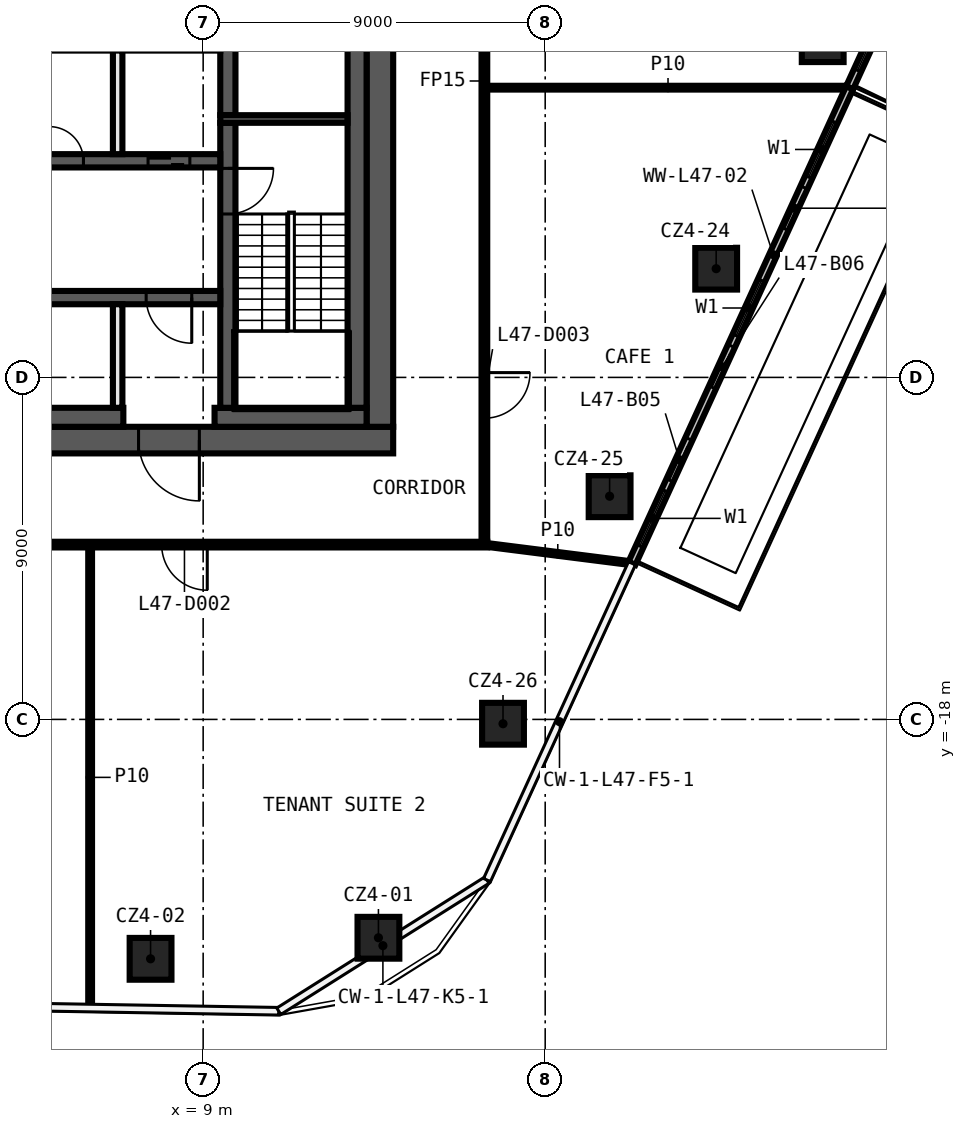
"""IFC4 building model, lengths in metres.
Left out: names, types, materials, properties, quantities, classifications, styles, units other than length and angle.
Written with IfcOpenShell. Run it as: python <this file> out.ifc"""

import sys

from ifc_helpers import new_model, si_unit, direction, frame, frame_2d, origin, origin_2d, place, context, subcontext, project, spatial, rectangle, extrude, element, fill, save


model = new_model("IFC4")
c1 = context("Model", 3, precision=1e-05, world=origin(), true_north=direction((0.0, 1.0)))
c2 = subcontext(c1, "Body", "Model", "MODEL_VIEW")
j1 = project(units=[si_unit("LENGTHUNIT", "METRE"), si_unit("PLANEANGLEUNIT", "RADIAN")], contexts=[c1])
p1 = place(None, origin())
s1 = spatial("IfcSite", under=j1, at=p1, CompositionType="ELEMENT")
p2 = place(p1, origin())
s2 = spatial("IfcBuilding", under=s1, at=p2, CompositionType="ELEMENT")
p3 = place(p2, frame((0.0, 0.0, 228.6)))
s3 = spatial("IfcBuildingStorey", under=s2, at=p3, CompositionType="ELEMENT", Elevation=228.6)
for number, where, z_axis, x_axis in (
    (1, (13.612, -23.746, 0.0), (0.0, 0.0, 1.0), (1.0, 0.0, 0.0)),
    (2, (7.616, -24.3, 0.0), (0.0, 0.0, 1.0), (1.0, 0.0, 0.0)),
    (3, (25.302, -0.152, 0.0), (0.0, 0.0, 1.0), (1.0, 0.0, 0.0)),
    (4, (22.499, -6.139, 0.0), (0.0, 0.0, 1.0), (1.0, 0.0, 0.0)),
    (5, (19.695, -12.127, 0.0), (0.0, 0.0, 1.0), (1.0, 0.0, 0.0)),
    (6, (16.89, -18.114, 0.0), (0.0, 0.0, 1.0), (1.0, 0.0, 0.0)),
):
    element("IfcColumn", number, at=place(p3, frame(where, z_axis=z_axis, x_axis=x_axis)), inside=s3, PredefinedType="COLUMN", context=c2, shape_type="SweptSolid", body=[
        extrude(rectangle(XDim=1.1, YDim=1.1, at=origin_2d()), origin(), (0.0, 0.0, 1.0), 3.75),
    ])
p4 = place(p3, frame((16.475, -13.4, 0.0), z_axis=(0.0, 0.0, 1.0), x_axis=(-1.0, 0.0, 0.0)))
e7 = element("IfcWall", 7, at=p4, inside=s3, PredefinedType="PARTITIONING", context=c2, shape_type="SweptSolid", body=[
    extrude(rectangle(XDim=18.55, YDim=0.15, at=frame_2d((9.275, 0.0))), origin(), (0.0, 0.0, 1.0), 3.75),
])
p5 = place(p4, frame((7.367, 0.0, 0.0)))
e8 = element("IfcOpeningElement", 8, at=p5, cuts=e7, PredefinedType="OPENING", context=c2, shape_type="SweptSolid", body=[
    extrude(rectangle(XDim=1.2, YDim=2.1, at=frame_2d((0.6, 1.05))), frame((0.0, 0.085, 0.0), z_axis=(0.0, -1.0, 0.0), x_axis=(1.0, 0.0, 0.0)), (0.0, 0.0, 1.0), 0.17),
])
p6 = place(p3, frame((16.475, -1.376, 0.0), z_axis=(0.0, 0.0, 1.0), x_axis=(1.0, 0.0, 0.0)))
e9 = element("IfcWall", 9, at=p6, inside=s3, PredefinedType="PARTITIONING", context=c2, shape_type="SweptSolid", body=[
    extrude(rectangle(XDim=9.514, YDim=0.1, at=frame_2d((4.757, 0.0))), origin(), (0.0, 0.0, 1.0), 3.75),
])
p7 = place(p3, frame((16.4, 13.325, 0.0), z_axis=(0.0, 0.0, 1.0), x_axis=(0.0, -1.0, 0.0)))
e10 = element("IfcWall", 10, at=p7, inside=s3, PredefinedType="PARTITIONING", context=c2, shape_type="SweptSolid", body=[
    extrude(rectangle(XDim=26.65, YDim=0.15, at=frame_2d((13.325, 0.0))), origin(), (0.0, 0.0, 1.0), 3.75),
])
p8 = place(p7, frame((22.199, 0.0, 0.0)))
e11 = element("IfcOpeningElement", 11, at=p8, cuts=e10, PredefinedType="OPENING", context=c2, shape_type="SweptSolid", body=[
    extrude(rectangle(XDim=1.2, YDim=2.1, at=frame_2d((0.6, 1.05))), frame((0.0, 0.085, 0.0), z_axis=(0.0, -1.0, 0.0), x_axis=(1.0, 0.0, 0.0)), (0.0, 0.0, 1.0), 0.17),
])
p9 = place(p7, frame((5.651, 0.0, 0.0)))
e12 = element("IfcOpeningElement", 12, at=p9, cuts=e10, PredefinedType="OPENING", context=c2, shape_type="SweptSolid", body=[
    extrude(rectangle(XDim=1.2, YDim=2.1, at=frame_2d((0.6, 1.05))), frame((0.0, 0.085, 0.0), z_axis=(0.0, -1.0, 0.0), x_axis=(1.0, 0.0, 0.0)), (0.0, 0.0, 1.0), 0.17),
])
p10 = place(p3, frame((6.026, -25.576, 0.0), z_axis=(0.0, 0.0, 1.0), x_axis=(0.0, 1.0, 0.0)))
e13 = element("IfcWall", 13, at=p10, inside=s3, PredefinedType="PARTITIONING", context=c2, shape_type="SweptSolid", body=[
    extrude(rectangle(XDim=12.101, YDim=0.1, at=frame_2d((6.05, 0.0))), origin(), (0.0, 0.0, 1.0), 3.75),
])
p11 = place(p3, frame((16.4, -13.4, 0.0), z_axis=(0.0, 0.0, 1.0), x_axis=(0.992073977013, -0.125655179493, 0.0)))
e14 = element("IfcWall", 14, at=p11, inside=s3, PredefinedType="PARTITIONING", context=c2, shape_type="SweptSolid", body=[
    extrude(rectangle(XDim=3.894, YDim=0.1, at=frame_2d((1.947, 0.0))), origin(), (0.0, 0.0, 1.0), 3.75),
])
p12 = place(p3, frame((20.283, -13.892, 0.0), z_axis=(0.0, 0.0, 1.0), x_axis=(0.416106802435, 0.909315747674, 0.0)))
e15 = element("IfcWall", 15, at=p12, inside=s3, PredefinedType="SOLIDWALL", context=c2, shape_type="SweptSolid", body=[
    extrude(rectangle(XDim=13.765, YDim=0.2, at=frame_2d((6.882, 0.0))), origin(), (0.0, 0.0, 1.0), 3.75),
])
p13 = place(p12, frame((0.5, 0.0, 0.6)))
e16 = element("IfcOpeningElement", 16, at=p13, cuts=e15, PredefinedType="OPENING", context=c2, shape_type="SweptSolid", body=[
    extrude(rectangle(XDim=1.6, YDim=2.4, at=frame_2d((0.8, 1.2))), frame((0.0, 0.11, 0.0), z_axis=(0.0, -1.0, 0.0), x_axis=(1.0, 0.0, 0.0)), (0.0, 0.0, 1.0), 0.22),
])
p14 = place(p12, frame((2.4, 0.0, 0.0)))
e17 = element("IfcOpeningElement", 17, at=p14, cuts=e15, PredefinedType="OPENING", context=c2, shape_type="SweptSolid", body=[
    extrude(rectangle(XDim=1.2, YDim=2.4, at=frame_2d((0.6, 1.2))), frame((0.0, 0.11, 0.0), z_axis=(0.0, -1.0, 0.0), x_axis=(1.0, 0.0, 0.0)), (0.0, 0.0, 1.0), 0.22),
])
p15 = place(p12, frame((6.588, 0.0, 0.6)))
e18 = element("IfcOpeningElement", 18, at=p15, cuts=e15, PredefinedType="OPENING", context=c2, shape_type="SweptSolid", body=[
    extrude(rectangle(XDim=1.6, YDim=2.4, at=frame_2d((0.8, 1.2))), frame((0.0, 0.11, 0.0), z_axis=(0.0, -1.0, 0.0), x_axis=(1.0, 0.0, 0.0)), (0.0, 0.0, 1.0), 0.22),
])
p16 = place(p12, frame((5.088, 0.0, 0.0)))
e19 = element("IfcOpeningElement", 19, at=p16, cuts=e15, PredefinedType="OPENING", context=c2, shape_type="SweptSolid", body=[
    extrude(rectangle(XDim=1.2, YDim=2.4, at=frame_2d((0.6, 1.2))), frame((0.0, 0.11, 0.0), z_axis=(0.0, -1.0, 0.0), x_axis=(1.0, 0.0, 0.0)), (0.0, 0.0, 1.0), 0.22),
])
p17 = place(p12, frame((11.176, 0.0, 0.6)))
e20 = element("IfcOpeningElement", 20, at=p17, cuts=e15, PredefinedType="OPENING", context=c2, shape_type="SweptSolid", body=[
    extrude(rectangle(XDim=1.6, YDim=2.4, at=frame_2d((0.8, 1.2))), frame((0.0, 0.11, 0.0), z_axis=(0.0, -1.0, 0.0), x_axis=(1.0, 0.0, 0.0)), (0.0, 0.0, 1.0), 0.22),
])
p18 = place(p12, frame((9.676, 0.0, 0.0)))
e21 = element("IfcOpeningElement", 21, at=p18, cuts=e15, PredefinedType="OPENING", context=c2, shape_type="SweptSolid", body=[
    extrude(rectangle(XDim=1.2, YDim=2.4, at=frame_2d((0.6, 1.2))), frame((0.0, 0.11, 0.0), z_axis=(0.0, -1.0, 0.0), x_axis=(1.0, 0.0, 0.0)), (0.0, 0.0, 1.0), 0.22),
])
p19 = place(p3, frame((26.011, -1.376, 0.0), z_axis=(0.0, 0.0, 1.0), x_axis=(0.416127690122, 0.909306189088, 0.0)))
e22 = element("IfcWall", 22, at=p19, inside=s3, PredefinedType="SOLIDWALL", context=c2, shape_type="SweptSolid", body=[
    extrude(rectangle(XDim=4.579, YDim=0.2, at=frame_2d((2.289, 0.0))), origin(), (0.0, 0.0, 1.0), 3.75),
])
p20 = place(p19, frame((0.5, 0.0, 0.6)))
e23 = element("IfcOpeningElement", 23, at=p20, cuts=e22, PredefinedType="OPENING", context=c2, shape_type="SweptSolid", body=[
    extrude(rectangle(XDim=1.6, YDim=2.4, at=frame_2d((0.8, 1.2))), frame((0.0, 0.11, 0.0), z_axis=(0.0, -1.0, 0.0), x_axis=(1.0, 0.0, 0.0)), (0.0, 0.0, 1.0), 0.22),
])
p21 = place(p19, frame((2.4, 0.0, 0.0)))
e24 = element("IfcOpeningElement", 24, at=p21, cuts=e22, PredefinedType="OPENING", context=c2, shape_type="SweptSolid", body=[
    extrude(rectangle(XDim=1.2, YDim=2.4, at=frame_2d((0.6, 1.2))), frame((0.0, 0.11, 0.0), z_axis=(0.0, -1.0, 0.0), x_axis=(1.0, 0.0, 0.0)), (0.0, 0.0, 1.0), 0.22),
])
p22 = place(p3, frame((14.0, -10.65, 0.0), z_axis=(0.0, 0.0, 1.0), x_axis=(-1.0, 0.0, 0.0)))
e25 = element("IfcWall", 25, at=p22, inside=s3, PredefinedType="SHEAR", context=c2, shape_type="SweptSolid", body=[
    extrude(rectangle(XDim=28.0, YDim=0.7, at=frame_2d((14.0, 0.0))), origin(), (0.0, 0.0, 1.0), 3.75),
])
p23 = place(p22, frame((5.1, 0.0, 0.0)))
e26 = element("IfcOpeningElement", 26, at=p23, cuts=e25, PredefinedType="OPENING", context=c2, shape_type="SweptSolid", body=[
    extrude(rectangle(XDim=1.6, YDim=2.1, at=frame_2d((0.8, 1.05))), frame((0.0, 0.36, 0.0), z_axis=(0.0, -1.0, 0.0), x_axis=(1.0, 0.0, 0.0)), (0.0, 0.0, 1.0), 0.72),
])
p24 = place(p3, frame((13.65, 10.3, 0.0), z_axis=(0.0, 0.0, 1.0), x_axis=(0.0, -1.0, 0.0)))
e27 = element("IfcWall", 27, at=p24, inside=s3, PredefinedType="SHEAR", context=c2, shape_type="SweptSolid", body=[
    extrude(rectangle(XDim=20.6, YDim=0.7, at=frame_2d((10.3, 0.0))), origin(), (0.0, 0.0, 1.0), 3.75),
])
p25 = place(p3, frame((13.3, -10.05, 0.0), z_axis=(0.0, 0.0, 1.0), x_axis=(-1.0, 0.0, 0.0)))
e28 = element("IfcWall", 28, at=p25, inside=s3, PredefinedType="SHEAR", context=c2, shape_type="SweptSolid", body=[
    extrude(rectangle(XDim=4.0, YDim=0.5, at=frame_2d((2.0, 0.0))), origin(), (0.0, 0.0, 1.0), 3.75),
])
p26 = place(p3, frame((6.9, -10.05, 0.0), z_axis=(0.0, 0.0, 1.0), x_axis=(-1.0, 0.0, 0.0)))
e29 = element("IfcWall", 29, at=p26, inside=s3, PredefinedType="SHEAR", context=c2, shape_type="SweptSolid", body=[
    extrude(rectangle(XDim=20.2, YDim=0.5, at=frame_2d((10.1, 0.0))), origin(), (0.0, 0.0, 1.0), 3.75),
])
p27 = place(p3, frame((13.05, 9.8, 0.0), z_axis=(0.0, 0.0, 1.0), x_axis=(0.0, -1.0, 0.0)))
e30 = element("IfcWall", 30, at=p27, inside=s3, PredefinedType="SHEAR", context=c2, shape_type="SweptSolid", body=[
    extrude(rectangle(XDim=19.6, YDim=0.5, at=frame_2d((9.8, 0.0))), origin(), (0.0, 0.0, 1.0), 3.75),
])
p28 = place(p3, frame((9.65, -2.3, 0.0), z_axis=(0.0, 0.0, 1.0), x_axis=(0.0, -1.0, 0.0)))
e31 = element("IfcWall", 31, at=p28, inside=s3, PredefinedType="SHEAR", context=c2, shape_type="SweptSolid", body=[
    extrude(rectangle(XDim=7.5, YDim=0.4, at=frame_2d((3.75, 0.0))), origin(), (0.0, 0.0, 1.0), 3.75),
])
p29 = place(p28, frame((1.2, 0.0, 0.0)))
e32 = element("IfcOpeningElement", 32, at=p29, cuts=e31, PredefinedType="OPENING", context=c2, shape_type="SweptSolid", body=[
    extrude(rectangle(XDim=1.2, YDim=2.1, at=frame_2d((0.6, 1.05))), frame((0.0, 0.21, 0.0), z_axis=(0.0, -1.0, 0.0), x_axis=(1.0, 0.0, 0.0)), (0.0, 0.0, 1.0), 0.42),
])
p30 = place(p3, frame((9.65, 2.1, 0.0), z_axis=(0.0, 0.0, 1.0), x_axis=(0.0, -1.0, 0.0)))
e33 = element("IfcWall", 33, at=p30, inside=s3, PredefinedType="SHEAR", context=c2, shape_type="SweptSolid", body=[
    extrude(rectangle(XDim=4.2, YDim=0.4, at=frame_2d((2.1, 0.0))), origin(), (0.0, 0.0, 1.0), 3.75),
])
p31 = place(p30, frame((0.15, 0.0, 0.0)))
e34 = element("IfcOpeningElement", 34, at=p31, cuts=e33, PredefinedType="OPENING", context=c2, shape_type="SweptSolid", body=[
    extrude(rectangle(XDim=0.9, YDim=2.1, at=frame_2d((0.45, 1.05))), frame((0.0, 0.21, 0.0), z_axis=(0.0, -1.0, 0.0), x_axis=(1.0, 0.0, 0.0)), (0.0, 0.0, 1.0), 0.42),
])
p32 = place(p3, frame((9.45, -2.2, 0.0), z_axis=(0.0, 0.0, 1.0), x_axis=(1.0, 0.0, 0.0)))
e35 = element("IfcWall", 35, at=p32, inside=s3, PredefinedType="SHEAR", context=c2, shape_type="SweptSolid", body=[
    extrude(rectangle(XDim=3.35, YDim=0.2, at=frame_2d((1.675, 0.0))), origin(), (0.0, 0.0, 1.0), 3.75),
])
p33 = place(p3, frame((-9.45, -3.3, 0.0), z_axis=(0.0, 0.0, 1.0), x_axis=(1.0, 0.0, 0.0)))
e36 = element("IfcWall", 36, at=p33, inside=s3, PredefinedType="SHEAR", context=c2, shape_type="SweptSolid", body=[
    extrude(rectangle(XDim=18.9, YDim=0.35, at=frame_2d((9.45, 0.0))), origin(), (0.0, 0.0, 1.0), 3.75),
])
p34 = place(p33, frame((0.8, 0.0, 0.0)))
e37 = element("IfcOpeningElement", 37, at=p34, cuts=e36, PredefinedType="OPENING", context=c2, shape_type="SweptSolid", body=[
    extrude(rectangle(XDim=1.1, YDim=2.1, at=frame_2d((0.55, 1.05))), frame((0.0, 0.185, 0.0), z_axis=(0.0, -1.0, 0.0), x_axis=(1.0, 0.0, 0.0)), (0.0, 0.0, 1.0), 0.37),
])
p35 = place(p33, frame((3.5, 0.0, 0.0)))
e38 = element("IfcOpeningElement", 38, at=p35, cuts=e36, PredefinedType="OPENING", context=c2, shape_type="SweptSolid", body=[
    extrude(rectangle(XDim=1.1, YDim=2.1, at=frame_2d((0.55, 1.05))), frame((0.0, 0.185, 0.0), z_axis=(0.0, -1.0, 0.0), x_axis=(1.0, 0.0, 0.0)), (0.0, 0.0, 1.0), 0.37),
])
p36 = place(p33, frame((6.2, 0.0, 0.0)))
e39 = element("IfcOpeningElement", 39, at=p36, cuts=e36, PredefinedType="OPENING", context=c2, shape_type="SweptSolid", body=[
    extrude(rectangle(XDim=1.1, YDim=2.1, at=frame_2d((0.55, 1.05))), frame((0.0, 0.185, 0.0), z_axis=(0.0, -1.0, 0.0), x_axis=(1.0, 0.0, 0.0)), (0.0, 0.0, 1.0), 0.37),
])
p37 = place(p33, frame((8.9, 0.0, 0.0)))
e40 = element("IfcOpeningElement", 40, at=p37, cuts=e36, PredefinedType="OPENING", context=c2, shape_type="SweptSolid", body=[
    extrude(rectangle(XDim=1.1, YDim=2.1, at=frame_2d((0.55, 1.05))), frame((0.0, 0.185, 0.0), z_axis=(0.0, -1.0, 0.0), x_axis=(1.0, 0.0, 0.0)), (0.0, 0.0, 1.0), 0.37),
])
p38 = place(p33, frame((17.0, 0.0, 0.0)))
e41 = element("IfcOpeningElement", 41, at=p38, cuts=e36, PredefinedType="OPENING", context=c2, shape_type="SweptSolid", body=[
    extrude(rectangle(XDim=1.1, YDim=2.1, at=frame_2d((0.55, 1.05))), frame((0.0, 0.185, 0.0), z_axis=(0.0, -1.0, 0.0), x_axis=(1.0, 0.0, 0.0)), (0.0, 0.0, 1.0), 0.37),
])
p39 = place(p33, frame((11.7, 0.0, 0.0)))
e42 = element("IfcOpeningElement", 42, at=p39, cuts=e36, PredefinedType="OPENING", context=c2, shape_type="SweptSolid", body=[
    extrude(rectangle(XDim=0.9, YDim=2.1, at=frame_2d((0.45, 1.05))), frame((0.0, 0.185, 0.0), z_axis=(0.0, -1.0, 0.0), x_axis=(1.0, 0.0, 0.0)), (0.0, 0.0, 1.0), 0.37),
])
p40 = place(p33, frame((14.4, 0.0, 0.0)))
e43 = element("IfcOpeningElement", 43, at=p40, cuts=e36, PredefinedType="OPENING", context=c2, shape_type="SweptSolid", body=[
    extrude(rectangle(XDim=0.9, YDim=2.1, at=frame_2d((0.45, 1.05))), frame((0.0, 0.185, 0.0), z_axis=(0.0, -1.0, 0.0), x_axis=(1.0, 0.0, 0.0)), (0.0, 0.0, 1.0), 0.37),
])
p41 = place(p3, frame((9.45, -6.9, 0.0), z_axis=(0.0, 0.0, 1.0), x_axis=(-1.0, 0.0, 0.0)))
e44 = element("IfcWall", 44, at=p41, inside=s3, PredefinedType="SHEAR", context=c2, shape_type="SweptSolid", body=[
    extrude(rectangle(XDim=18.9, YDim=0.35, at=frame_2d((9.45, 0.0))), origin(), (0.0, 0.0, 1.0), 3.75),
])
p42 = place(p41, frame((0.75, 0.0, 0.0)))
e45 = element("IfcOpeningElement", 45, at=p42, cuts=e44, PredefinedType="OPENING", context=c2, shape_type="SweptSolid", body=[
    extrude(rectangle(XDim=1.2, YDim=2.1, at=frame_2d((0.6, 1.05))), frame((0.0, 0.185, 0.0), z_axis=(0.0, -1.0, 0.0), x_axis=(1.0, 0.0, 0.0)), (0.0, 0.0, 1.0), 0.37),
])
p43 = place(p41, frame((15.75, 0.0, 0.0)))
e46 = element("IfcOpeningElement", 46, at=p43, cuts=e44, PredefinedType="OPENING", context=c2, shape_type="SweptSolid", body=[
    extrude(rectangle(XDim=0.9, YDim=2.1, at=frame_2d((0.45, 1.05))), frame((0.0, 0.185, 0.0), z_axis=(0.0, -1.0, 0.0), x_axis=(1.0, 0.0, 0.0)), (0.0, 0.0, 1.0), 0.37),
])
p44 = place(p41, frame((10.35, 0.0, 0.0)))
e47 = element("IfcOpeningElement", 47, at=p44, cuts=e44, PredefinedType="OPENING", context=c2, shape_type="SweptSolid", body=[
    extrude(rectangle(XDim=0.9, YDim=2.1, at=frame_2d((0.45, 1.05))), frame((0.0, 0.185, 0.0), z_axis=(0.0, -1.0, 0.0), x_axis=(1.0, 0.0, 0.0)), (0.0, 0.0, 1.0), 0.37),
])
for number, where, z_axis, x_axis in (
    (48, (6.75, -9.8, 0.0), (0.0, 0.0, 1.0), (0.0, 1.0, 0.0)),
    (49, (6.75, -3.125, 0.0), (0.0, 0.0, 1.0), (0.0, 1.0, 0.0)),
):
    element("IfcWall", number, at=place(p3, frame(where, z_axis=z_axis, x_axis=x_axis)), inside=s3, PredefinedType="SOLIDWALL", context=c2, shape_type="SweptSolid", body=[
        extrude(rectangle(XDim=2.725, YDim=0.25, at=frame_2d((1.363, 0.0))), origin(), (0.0, 0.0, 1.0), 3.75),
    ])
p45 = place(p5, origin())
e50 = element("IfcDoor", 50, at=p45, inside=s3, OperationType="SINGLE_SWING_LEFT", PredefinedType="DOOR", context=c2, shape_type="SweptSolid", body=[
    extrude(rectangle(XDim=1.2, YDim=2.1, at=frame_2d((0.6, 1.05))), frame((0.0, 0.025, 0.0), z_axis=(0.0, -1.0, 0.0), x_axis=(1.0, 0.0, 0.0)), (0.0, 0.0, 1.0), 0.05),
])
fill(e8, e50)
p46 = place(p8, origin())
e51 = element("IfcDoor", 51, at=p46, inside=s3, OperationType="SINGLE_SWING_RIGHT", PredefinedType="DOOR", context=c2, shape_type="SweptSolid", body=[
    extrude(rectangle(XDim=1.2, YDim=2.1, at=frame_2d((0.6, 1.05))), frame((0.0, 0.025, 0.0), z_axis=(0.0, -1.0, 0.0), x_axis=(1.0, 0.0, 0.0)), (0.0, 0.0, 1.0), 0.05),
])
fill(e11, e51)
p47 = place(p13, origin())
e52 = element("IfcWindow", 52, at=p47, inside=s3, PartitioningType="SINGLE_PANEL", PredefinedType="WINDOW", context=c2, shape_type="SweptSolid", body=[
    extrude(rectangle(XDim=1.6, YDim=2.4, at=frame_2d((0.8, 1.2))), frame((0.0, 0.03, 0.0), z_axis=(0.0, -1.0, 0.0), x_axis=(1.0, 0.0, 0.0)), (0.0, 0.0, 1.0), 0.06),
])
fill(e16, e52)
p48 = place(p14, origin())
e53 = element("IfcDoor", 53, at=p48, inside=s3, OperationType="SLIDING_TO_LEFT", PredefinedType="DOOR", context=c2, shape_type="SweptSolid", body=[
    extrude(rectangle(XDim=1.2, YDim=2.4, at=frame_2d((0.6, 1.2))), frame((0.0, 0.025, 0.0), z_axis=(0.0, -1.0, 0.0), x_axis=(1.0, 0.0, 0.0)), (0.0, 0.0, 1.0), 0.05),
])
fill(e17, e53)
p49 = place(p15, origin())
e54 = element("IfcWindow", 54, at=p49, inside=s3, PartitioningType="SINGLE_PANEL", PredefinedType="WINDOW", context=c2, shape_type="SweptSolid", body=[
    extrude(rectangle(XDim=1.6, YDim=2.4, at=frame_2d((0.8, 1.2))), frame((0.0, 0.03, 0.0), z_axis=(0.0, -1.0, 0.0), x_axis=(1.0, 0.0, 0.0)), (0.0, 0.0, 1.0), 0.06),
])
fill(e18, e54)
p50 = place(p16, origin())
e55 = element("IfcDoor", 55, at=p50, inside=s3, OperationType="SLIDING_TO_LEFT", PredefinedType="DOOR", context=c2, shape_type="SweptSolid", body=[
    extrude(rectangle(XDim=1.2, YDim=2.4, at=frame_2d((0.6, 1.2))), frame((0.0, 0.025, 0.0), z_axis=(0.0, -1.0, 0.0), x_axis=(1.0, 0.0, 0.0)), (0.0, 0.0, 1.0), 0.05),
])
fill(e19, e55)
p51 = place(p17, origin())
e56 = element("IfcWindow", 56, at=p51, inside=s3, PartitioningType="SINGLE_PANEL", PredefinedType="WINDOW", context=c2, shape_type="SweptSolid", body=[
    extrude(rectangle(XDim=1.6, YDim=2.4, at=frame_2d((0.8, 1.2))), frame((0.0, 0.03, 0.0), z_axis=(0.0, -1.0, 0.0), x_axis=(1.0, 0.0, 0.0)), (0.0, 0.0, 1.0), 0.06),
])
fill(e20, e56)
p52 = place(p18, origin())
e57 = element("IfcDoor", 57, at=p52, inside=s3, OperationType="SLIDING_TO_LEFT", PredefinedType="DOOR", context=c2, shape_type="SweptSolid", body=[
    extrude(rectangle(XDim=1.2, YDim=2.4, at=frame_2d((0.6, 1.2))), frame((0.0, 0.025, 0.0), z_axis=(0.0, -1.0, 0.0), x_axis=(1.0, 0.0, 0.0)), (0.0, 0.0, 1.0), 0.05),
])
fill(e21, e57)
p53 = place(p20, origin())
e58 = element("IfcWindow", 58, at=p53, inside=s3, PartitioningType="SINGLE_PANEL", PredefinedType="WINDOW", context=c2, shape_type="SweptSolid", body=[
    extrude(rectangle(XDim=1.6, YDim=2.4, at=frame_2d((0.8, 1.2))), frame((0.0, 0.03, 0.0), z_axis=(0.0, -1.0, 0.0), x_axis=(1.0, 0.0, 0.0)), (0.0, 0.0, 1.0), 0.06),
])
fill(e23, e58)
p54 = place(p38, origin())
e59 = element("IfcDoor", 59, at=p54, inside=s3, OperationType="DOUBLE_DOOR_SLIDING", PredefinedType="DOOR", context=c2, shape_type="SweptSolid", body=[
    extrude(rectangle(XDim=1.1, YDim=2.1, at=frame_2d((0.55, 1.05))), frame((0.0, 0.025, 0.0), z_axis=(0.0, -1.0, 0.0), x_axis=(1.0, 0.0, 0.0)), (0.0, 0.0, 1.0), 0.05),
])
fill(e41, e59)
p55 = place(p23, origin())
e60 = element("IfcDoor", 60, at=p55, inside=s3, OperationType="DOUBLE_DOOR_SINGLE_SWING", PredefinedType="DOOR", context=c2, shape_type="SweptSolid", body=[
    extrude(rectangle(XDim=1.6, YDim=2.1, at=frame_2d((0.8, 1.05))), frame((0.0, 0.025, 0.0), z_axis=(0.0, -1.0, 0.0), x_axis=(1.0, 0.0, 0.0)), (0.0, 0.0, 1.0), 0.05),
])
fill(e26, e60)
p56 = place(p42, origin())
e61 = element("IfcDoor", 61, at=p56, inside=s3, OperationType="SINGLE_SWING_LEFT", PredefinedType="DOOR", context=c2, shape_type="SweptSolid", body=[
    extrude(rectangle(XDim=1.2, YDim=2.1, at=frame_2d((0.6, 1.05))), frame((0.0, 0.025, 0.0), z_axis=(0.0, -1.0, 0.0), x_axis=(1.0, 0.0, 0.0)), (0.0, 0.0, 1.0), 0.05),
])
fill(e45, e61)
p57 = place(p40, origin())
e62 = element("IfcDoor", 62, at=p57, inside=s3, OperationType="SINGLE_SWING_LEFT", PredefinedType="DOOR", context=c2, shape_type="SweptSolid", body=[
    extrude(rectangle(XDim=0.9, YDim=2.1, at=frame_2d((0.45, 1.05))), frame((0.0, 0.025, 0.0), z_axis=(0.0, -1.0, 0.0), x_axis=(1.0, 0.0, 0.0)), (0.0, 0.0, 1.0), 0.05),
])
fill(e43, e62)
p58 = place(p29, origin())
e63 = element("IfcDoor", 63, at=p58, inside=s3, OperationType="SINGLE_SWING_RIGHT", PredefinedType="DOOR", context=c2, shape_type="SweptSolid", body=[
    extrude(rectangle(XDim=1.2, YDim=2.1, at=frame_2d((0.6, 1.05))), frame((0.0, 0.025, 0.0), z_axis=(0.0, -1.0, 0.0), x_axis=(1.0, 0.0, 0.0)), (0.0, 0.0, 1.0), 0.05),
])
fill(e32, e63)
save(model, sys.argv[1])
